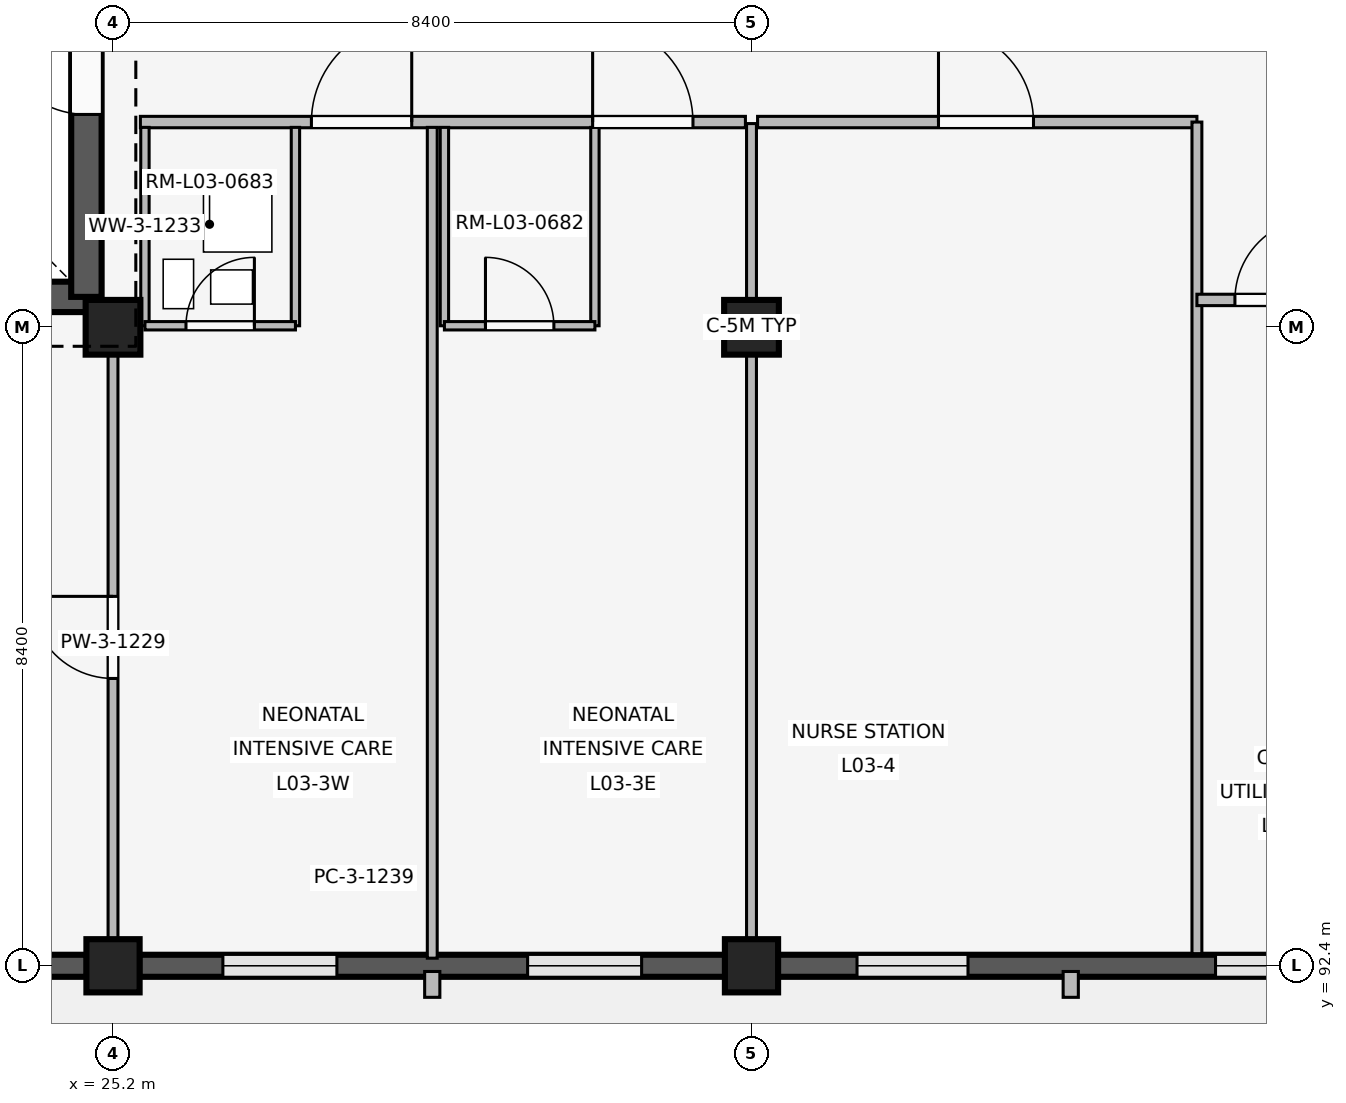
"""IFC4 building model, lengths in metres.
Left out: names, types, materials, properties, quantities, classifications, styles, units other than length and angle.
Written with IfcOpenShell. Run it as: python <this file> out.ifc"""

import sys

from ifc_helpers import new_model, si_unit, direction, frame, frame_2d, origin, origin_2d, place, context, subcontext, project, spatial, rectangle, extrude, element, fill, save


model = new_model("IFC4")
c1 = context("Model", 3, precision=1e-05, world=origin(), true_north=direction((0.0, 1.0)))
c2 = subcontext(c1, "Body", "Model", "MODEL_VIEW")
j1 = project(units=[si_unit("LENGTHUNIT", "METRE"), si_unit("PLANEANGLEUNIT", "RADIAN")], contexts=[c1])
p1 = place(None, origin())
s1 = spatial("IfcSite", under=j1, at=p1, CompositionType="ELEMENT")
p2 = place(p1, origin())
s2 = spatial("IfcBuilding", under=s1, at=p2, CompositionType="ELEMENT")
p3 = place(p2, frame((0.0, 0.0, 12.9)))
s3 = spatial("IfcBuildingStorey", under=s2, at=p3, CompositionType="ELEMENT", Elevation=12.9)
p4 = place(p3, frame((25.2, 92.4, 0.0), z_axis=(0.0, 0.0, 1.0), x_axis=(1.0, 0.0, 0.0)))
e1 = element("IfcColumn", 1, at=p4, inside=s3, PredefinedType="COLUMN", context=c2, shape_type="SweptSolid", body=[
    extrude(rectangle(XDim=0.7, YDim=0.7, at=origin_2d()), origin(), (0.0, 0.0, 1.0), 3.3),
])
p5 = place(p3, frame((25.2, 100.8, 0.0), z_axis=(0.0, 0.0, 1.0), x_axis=(1.0, 0.0, 0.0)))
e2 = element("IfcColumn", 2, at=p5, inside=s3, PredefinedType="COLUMN", context=c2, shape_type="SweptSolid", body=[
    extrude(rectangle(XDim=0.72, YDim=0.72, at=origin_2d()), origin(), (0.0, 0.0, 1.0), 3.3),
])
p6 = place(p3, frame((33.6, 92.4, 0.0), z_axis=(0.0, 0.0, 1.0), x_axis=(1.0, 0.0, 0.0)))
e3 = element("IfcColumn", 3, at=p6, inside=s3, PredefinedType="COLUMN", context=c2, shape_type="SweptSolid", body=[
    extrude(rectangle(XDim=0.7, YDim=0.7, at=origin_2d()), origin(), (0.0, 0.0, 1.0), 3.3),
])
p7 = place(p3, frame((33.6, 100.8, 0.0), z_axis=(0.0, 0.0, 1.0), x_axis=(1.0, 0.0, 0.0)))
e4 = element("IfcColumn", 4, at=p7, inside=s3, PredefinedType="COLUMN", context=c2, shape_type="SweptSolid", body=[
    extrude(rectangle(XDim=0.72, YDim=0.72, at=origin_2d()), origin(), (0.0, 0.0, 1.0), 3.3),
])
p8 = place(p3, frame((24.855, 92.4, 0.0), z_axis=(0.0, 0.0, 1.0), x_axis=(-1.0, 0.0, 0.0)))
e5 = element("IfcWall", 5, at=p8, inside=s3, PredefinedType="SOLIDWALL", context=c2, shape_type="SweptSolid", body=[
    extrude(rectangle(XDim=7.71, YDim=0.29, at=frame_2d((3.855, 0.0))), origin(), (0.0, 0.0, 1.0), 2.44),
])
p9 = place(p8, frame((1.2, 0.0, 1.05)))
e6 = element("IfcOpeningElement", 6, at=p9, cuts=e5, PredefinedType="OPENING", context=c2, shape_type="SweptSolid", body=[
    extrude(rectangle(XDim=1.3, YDim=0.75, at=frame_2d((0.65, 0.375))), frame((0.0, 0.155, 0.0), z_axis=(0.0, -1.0, 0.0), x_axis=(1.0, 0.0, 0.0)), (0.0, 0.0, 1.0), 0.31),
])
p10 = place(p8, frame((5.21, 0.0, 1.05)))
e7 = element("IfcOpeningElement", 7, at=p10, cuts=e5, PredefinedType="OPENING", context=c2, shape_type="SweptSolid", body=[
    extrude(rectangle(XDim=1.3, YDim=0.75, at=frame_2d((0.65, 0.375))), frame((0.0, 0.155, 0.0), z_axis=(0.0, -1.0, 0.0), x_axis=(1.0, 0.0, 0.0)), (0.0, 0.0, 1.0), 0.31),
])
p11 = place(p3, frame((33.255, 92.4, 0.0), z_axis=(0.0, 0.0, 1.0), x_axis=(-1.0, 0.0, 0.0)))
e8 = element("IfcWall", 8, at=p11, inside=s3, PredefinedType="SOLIDWALL", context=c2, shape_type="SweptSolid", body=[
    extrude(rectangle(XDim=7.71, YDim=0.29, at=frame_2d((3.855, 0.0))), origin(), (0.0, 0.0, 1.0), 2.44),
])
p12 = place(p11, frame((1.1, 0.0, 1.05)))
e9 = element("IfcOpeningElement", 9, at=p12, cuts=e8, PredefinedType="OPENING", context=c2, shape_type="SweptSolid", body=[
    extrude(rectangle(XDim=1.5, YDim=0.75, at=frame_2d((0.75, 0.375))), frame((0.0, 0.155, 0.0), z_axis=(0.0, -1.0, 0.0), x_axis=(1.0, 0.0, 0.0)), (0.0, 0.0, 1.0), 0.31),
])
p13 = place(p11, frame((5.11, 0.0, 1.05)))
e10 = element("IfcOpeningElement", 10, at=p13, cuts=e8, PredefinedType="OPENING", context=c2, shape_type="SweptSolid", body=[
    extrude(rectangle(XDim=1.5, YDim=0.75, at=frame_2d((0.75, 0.375))), frame((0.0, 0.155, 0.0), z_axis=(0.0, -1.0, 0.0), x_axis=(1.0, 0.0, 0.0)), (0.0, 0.0, 1.0), 0.31),
])
p14 = place(p3, frame((29.4, 92.325, 0.0), z_axis=(0.0, 0.0, 1.0), x_axis=(0.0, -1.0, 0.0)))
e11 = element("IfcWall", 11, at=p14, inside=s3, PredefinedType="ELEMENTEDWALL", context=c2, shape_type="SweptSolid", body=[
    extrude(rectangle(XDim=0.34, YDim=0.2, at=frame_2d((0.17, 0.0))), origin(), (0.0, 0.0, 1.0), 2.42),
])
p15 = place(p3, frame((41.655, 92.4, 0.0), z_axis=(0.0, 0.0, 1.0), x_axis=(-1.0, 0.0, 0.0)))
e12 = element("IfcWall", 12, at=p15, inside=s3, PredefinedType="SOLIDWALL", context=c2, shape_type="SweptSolid", body=[
    extrude(rectangle(XDim=7.71, YDim=0.29, at=frame_2d((3.855, 0.0))), origin(), (0.0, 0.0, 1.0), 2.44),
])
p16 = place(p15, frame((0.49, 0.0, 0.85)))
e13 = element("IfcOpeningElement", 13, at=p16, cuts=e12, PredefinedType="OPENING", context=c2, shape_type="SweptSolid", body=[
    extrude(rectangle(XDim=1.46, YDim=0.85, at=frame_2d((0.73, 0.425))), frame((0.0, 0.155, 0.0), z_axis=(0.0, -1.0, 0.0), x_axis=(1.0, 0.0, 0.0)), (0.0, 0.0, 1.0), 0.31),
])
p17 = place(p15, frame((5.207, 0.0, 0.85)))
e14 = element("IfcOpeningElement", 14, at=p17, cuts=e12, PredefinedType="OPENING", context=c2, shape_type="SweptSolid", body=[
    extrude(rectangle(XDim=1.46, YDim=0.85, at=frame_2d((0.73, 0.425))), frame((0.0, 0.155, 0.0), z_axis=(0.0, -1.0, 0.0), x_axis=(1.0, 0.0, 0.0)), (0.0, 0.0, 1.0), 0.31),
])
p18 = place(p3, frame((37.8, 92.325, 0.0), z_axis=(0.0, 0.0, 1.0), x_axis=(0.0, -1.0, 0.0)))
e15 = element("IfcWall", 15, at=p18, inside=s3, PredefinedType="ELEMENTEDWALL", context=c2, shape_type="SweptSolid", body=[
    extrude(rectangle(XDim=0.34, YDim=0.2, at=frame_2d((0.17, 0.0))), origin(), (0.0, 0.0, 1.0), 2.42),
])
p19 = place(p3, frame((17.35, 101.2, 0.0), z_axis=(0.0, 0.0, 1.0), x_axis=(1.0, 0.0, 0.0)))
e16 = element("IfcWall", 16, at=p19, inside=s3, PredefinedType="SHEAR", context=c2, shape_type="SweptSolid", body=[
    extrude(rectangle(XDim=7.5, YDim=0.4, at=frame_2d((3.75, 0.0))), origin(), (0.0, 0.0, 1.0), 3.02),
])
p20 = place(p19, frame((4.85, 0.0, 0.0)))
e17 = element("IfcOpeningElement", 17, at=p20, cuts=e16, PredefinedType="OPENING", context=c2, shape_type="SweptSolid", body=[
    extrude(rectangle(XDim=1.2, YDim=2.2, at=frame_2d((0.6, 1.1))), frame((0.0, 0.21, 0.0), z_axis=(0.0, -1.0, 0.0), x_axis=(1.0, 0.0, 0.0)), (0.0, 0.0, 1.0), 0.42),
])
p21 = place(p3, frame((24.85, 101.2, 0.0), z_axis=(0.0, 0.0, 1.0), x_axis=(0.0, 1.0, 0.0)))
e18 = element("IfcWall", 18, at=p21, inside=s3, PredefinedType="SHEAR", context=c2, shape_type="SweptSolid", body=[
    extrude(rectangle(XDim=7.55, YDim=0.4, at=frame_2d((3.775, 0.0))), origin(), (0.0, 0.0, 1.0), 3.02),
])
p22 = place(p21, frame((2.4, 0.0, 0.0)))
e19 = element("IfcOpeningElement", 19, at=p22, cuts=e18, PredefinedType="OPENING", context=c2, shape_type="SweptSolid", body=[
    extrude(rectangle(XDim=1.2, YDim=2.2, at=frame_2d((0.6, 1.1))), frame((0.0, 0.21, 0.0), z_axis=(0.0, -1.0, 0.0), x_axis=(1.0, 0.0, 0.0)), (0.0, 0.0, 1.0), 0.42),
])
p23 = place(p3, frame((25.2, 92.54, 0.0), z_axis=(0.0, 0.0, 1.0), x_axis=(0.0, 1.0, 0.0)))
e20 = element("IfcWall", 20, at=p23, inside=s3, PredefinedType="PARTITIONING", context=c2, shape_type="SweptSolid", body=[
    extrude(rectangle(XDim=8.21, YDim=0.13, at=frame_2d((4.105, 0.0))), origin(), (0.0, 0.0, 1.0), 2.42),
])
p24 = place(p23, frame((3.64, 0.0, 0.0)))
e21 = element("IfcOpeningElement", 21, at=p24, cuts=e20, PredefinedType="OPENING", context=c2, shape_type="SweptSolid", body=[
    extrude(rectangle(XDim=1.08, YDim=2.15, at=frame_2d((0.54, 1.075))), frame((0.0, 0.075, 0.0), z_axis=(0.0, -1.0, 0.0), x_axis=(1.0, 0.0, 0.0)), (0.0, 0.0, 1.0), 0.15),
])
p25 = place(p3, frame((25.56, 103.5, 0.0), z_axis=(0.0, 0.0, 1.0), x_axis=(1.0, 0.0, 0.0)))
e22 = element("IfcWall", 22, at=p25, inside=s3, PredefinedType="PARTITIONING", context=c2, shape_type="SweptSolid", body=[
    extrude(rectangle(XDim=7.96, YDim=0.15, at=frame_2d((3.98, 0.0))), origin(), (0.0, 0.0, 1.0), 2.42),
])
p26 = place(p25, frame((2.25, 0.0, 0.0)))
e23 = element("IfcOpeningElement", 23, at=p26, cuts=e22, PredefinedType="OPENING", context=c2, shape_type="SweptSolid", body=[
    extrude(rectangle(XDim=1.32, YDim=2.25, at=frame_2d((0.66, 1.125))), frame((0.0, 0.085, 0.0), z_axis=(0.0, -1.0, 0.0), x_axis=(1.0, 0.0, 0.0)), (0.0, 0.0, 1.0), 0.17),
])
p27 = place(p25, frame((5.95, 0.0, 0.0)))
e24 = element("IfcOpeningElement", 24, at=p27, cuts=e22, PredefinedType="OPENING", context=c2, shape_type="SweptSolid", body=[
    extrude(rectangle(XDim=1.32, YDim=2.25, at=frame_2d((0.66, 1.125))), frame((0.0, 0.085, 0.0), z_axis=(0.0, -1.0, 0.0), x_axis=(1.0, 0.0, 0.0)), (0.0, 0.0, 1.0), 0.17),
])
p28 = place(p3, frame((29.4, 92.5, 0.0), z_axis=(0.0, 0.0, 1.0), x_axis=(0.0, 1.0, 0.0)))
e25 = element("IfcWall", 25, at=p28, inside=s3, PredefinedType="PARTITIONING", context=c2, shape_type="SweptSolid", body=[
    extrude(rectangle(XDim=10.93, YDim=0.13, at=frame_2d((5.465, 0.0))), origin(), (0.0, 0.0, 1.0), 2.42),
])
for number, where, z_axis, x_axis in (
    (26, (25.62, 100.82, 0.0), (0.0, 0.0, 1.0), (0.0, 1.0, 0.0)),
    (27, (27.6, 100.82, 0.0), (0.0, 0.0, 1.0), (0.0, 1.0, 0.0)),
):
    element("IfcWall", number, at=place(p3, frame(where, z_axis=z_axis, x_axis=x_axis)), inside=s3, PredefinedType="PARTITIONING", context=c2, shape_type="SweptSolid", body=[
        extrude(rectangle(XDim=2.61, YDim=0.11, at=frame_2d((1.305, 0.0))), origin(), (0.0, 0.0, 1.0), 2.42),
    ])
p29 = place(p3, frame((25.62, 100.82, 0.0), z_axis=(0.0, 0.0, 1.0), x_axis=(1.0, 0.0, 0.0)))
e28 = element("IfcWall", 28, at=p29, inside=s3, PredefinedType="PARTITIONING", context=c2, shape_type="SweptSolid", body=[
    extrude(rectangle(XDim=1.98, YDim=0.11, at=frame_2d((0.99, 0.0))), origin(), (0.0, 0.0, 1.0), 2.42),
])
p30 = place(p29, frame((0.54, 0.0, 0.0)))
e29 = element("IfcOpeningElement", 29, at=p30, cuts=e28, PredefinedType="OPENING", context=c2, shape_type="SweptSolid", body=[
    extrude(rectangle(XDim=0.9, YDim=2.1, at=frame_2d((0.45, 1.05))), frame((0.0, 0.065, 0.0), z_axis=(0.0, -1.0, 0.0), x_axis=(1.0, 0.0, 0.0)), (0.0, 0.0, 1.0), 0.13),
])
for number, where, z_axis, x_axis in (
    (30, (29.56, 100.82, 0.0), (0.0, 0.0, 1.0), (0.0, 1.0, 0.0)),
    (31, (31.54, 100.82, 0.0), (0.0, 0.0, 1.0), (0.0, 1.0, 0.0)),
):
    element("IfcWall", number, at=place(p3, frame(where, z_axis=z_axis, x_axis=x_axis)), inside=s3, PredefinedType="PARTITIONING", context=c2, shape_type="SweptSolid", body=[
        extrude(rectangle(XDim=2.61, YDim=0.11, at=frame_2d((1.305, 0.0))), origin(), (0.0, 0.0, 1.0), 2.42),
    ])
p31 = place(p3, frame((29.56, 100.82, 0.0), z_axis=(0.0, 0.0, 1.0), x_axis=(1.0, 0.0, 0.0)))
e32 = element("IfcWall", 32, at=p31, inside=s3, PredefinedType="PARTITIONING", context=c2, shape_type="SweptSolid", body=[
    extrude(rectangle(XDim=1.98, YDim=0.11, at=frame_2d((0.99, 0.0))), origin(), (0.0, 0.0, 1.0), 2.42),
])
p32 = place(p31, frame((0.54, 0.0, 0.0)))
e33 = element("IfcOpeningElement", 33, at=p32, cuts=e32, PredefinedType="OPENING", context=c2, shape_type="SweptSolid", body=[
    extrude(rectangle(XDim=0.9, YDim=2.1, at=frame_2d((0.45, 1.05))), frame((0.0, 0.065, 0.0), z_axis=(0.0, -1.0, 0.0), x_axis=(1.0, 0.0, 0.0)), (0.0, 0.0, 1.0), 0.13),
])
p33 = place(p3, frame((28.05, 93.55, 0.0), z_axis=(0.0, 0.0, 1.0), x_axis=(1.0, 0.0, 0.0)))
e34 = element("IfcWall", 34, at=p33, inside=s3, PredefinedType="PLUMBINGWALL", context=c2, shape_type="SweptSolid", body=[
    extrude(rectangle(XDim=0.9, YDim=0.24, at=frame_2d((0.45, 0.0))), origin(), (0.0, 0.0, 1.0), 2.42),
])
p34 = place(p3, frame((33.6, 92.54, 0.0), z_axis=(0.0, 0.0, 1.0), x_axis=(0.0, 1.0, 0.0)))
e35 = element("IfcWall", 35, at=p34, inside=s3, PredefinedType="PARTITIONING", context=c2, shape_type="SweptSolid", body=[
    extrude(rectangle(XDim=10.94, YDim=0.13, at=frame_2d((5.47, 0.0))), origin(), (0.0, 0.0, 1.0), 2.42),
])
p35 = place(p3, frame((33.68, 103.5, 0.0), z_axis=(0.0, 0.0, 1.0), x_axis=(1.0, 0.0, 0.0)))
e36 = element("IfcWall", 36, at=p35, inside=s3, PredefinedType="PARTITIONING", context=c2, shape_type="SweptSolid", body=[
    extrude(rectangle(XDim=5.78, YDim=0.15, at=frame_2d((2.89, 0.0))), origin(), (0.0, 0.0, 1.0), 2.42),
])
p36 = place(p35, frame((2.38, 0.0, 0.0)))
e37 = element("IfcOpeningElement", 37, at=p36, cuts=e36, PredefinedType="OPENING", context=c2, shape_type="SweptSolid", body=[
    extrude(rectangle(XDim=1.25, YDim=2.2, at=frame_2d((0.625, 1.1))), frame((0.0, 0.085, 0.0), z_axis=(0.0, -1.0, 0.0), x_axis=(1.0, 0.0, 0.0)), (0.0, 0.0, 1.0), 0.17),
])
p37 = place(p3, frame((39.46, 92.56, 0.0), z_axis=(0.0, 0.0, 1.0), x_axis=(0.0, 1.0, 0.0)))
e38 = element("IfcWall", 38, at=p37, inside=s3, PredefinedType="PARTITIONING", context=c2, shape_type="SweptSolid", body=[
    extrude(rectangle(XDim=10.94, YDim=0.13, at=frame_2d((5.47, 0.0))), origin(), (0.0, 0.0, 1.0), 2.42),
])
p38 = place(p3, frame((39.46, 101.16, 0.0), z_axis=(0.0, 0.0, 1.0), x_axis=(1.0, 0.0, 0.0)))
e39 = element("IfcWall", 39, at=p38, inside=s3, PredefinedType="PARTITIONING", context=c2, shape_type="SweptSolid", body=[
    extrude(rectangle(XDim=2.18, YDim=0.15, at=frame_2d((1.09, 0.0))), origin(), (0.0, 0.0, 1.0), 2.42),
])
p39 = place(p38, frame((0.5, 0.0, 0.0)))
e40 = element("IfcOpeningElement", 40, at=p39, cuts=e39, PredefinedType="OPENING", context=c2, shape_type="SweptSolid", body=[
    extrude(rectangle(XDim=1.08, YDim=2.15, at=frame_2d((0.54, 1.075))), frame((0.0, 0.085, 0.0), z_axis=(0.0, -1.0, 0.0), x_axis=(1.0, 0.0, 0.0)), (0.0, 0.0, 1.0), 0.17),
])
p40 = place(p12, origin())
e41 = element("IfcWindow", 41, at=p40, inside=s3, PartitioningType="SINGLE_PANEL", PredefinedType="WINDOW", context=c2, shape_type="SweptSolid", body=[
    extrude(rectangle(XDim=1.5, YDim=0.75, at=frame_2d((0.75, 0.375))), frame((0.0, 0.03, 0.0), z_axis=(0.0, -1.0, 0.0), x_axis=(1.0, 0.0, 0.0)), (0.0, 0.0, 1.0), 0.06),
])
fill(e9, e41)
p41 = place(p13, origin())
e42 = element("IfcWindow", 42, at=p41, inside=s3, PartitioningType="SINGLE_PANEL", PredefinedType="WINDOW", context=c2, shape_type="SweptSolid", body=[
    extrude(rectangle(XDim=1.5, YDim=0.75, at=frame_2d((0.75, 0.375))), frame((0.0, 0.03, 0.0), z_axis=(0.0, -1.0, 0.0), x_axis=(1.0, 0.0, 0.0)), (0.0, 0.0, 1.0), 0.06),
])
fill(e10, e42)
p42 = place(p16, origin())
e43 = element("IfcWindow", 43, at=p42, inside=s3, PartitioningType="SINGLE_PANEL", PredefinedType="WINDOW", context=c2, shape_type="SweptSolid", body=[
    extrude(rectangle(XDim=1.46, YDim=0.85, at=frame_2d((0.73, 0.425))), frame((0.0, 0.03, 0.0), z_axis=(0.0, -1.0, 0.0), x_axis=(1.0, 0.0, 0.0)), (0.0, 0.0, 1.0), 0.06),
])
fill(e13, e43)
p43 = place(p17, origin())
e44 = element("IfcWindow", 44, at=p43, inside=s3, PartitioningType="SINGLE_PANEL", PredefinedType="WINDOW", context=c2, shape_type="SweptSolid", body=[
    extrude(rectangle(XDim=1.46, YDim=0.85, at=frame_2d((0.73, 0.425))), frame((0.0, 0.03, 0.0), z_axis=(0.0, -1.0, 0.0), x_axis=(1.0, 0.0, 0.0)), (0.0, 0.0, 1.0), 0.06),
])
fill(e14, e44)
p44 = place(p22, origin())
e45 = element("IfcDoor", 45, at=p44, inside=s3, OperationType="SINGLE_SWING_RIGHT", PredefinedType="DOOR", context=c2, shape_type="SweptSolid", body=[
    extrude(rectangle(XDim=1.2, YDim=2.2, at=frame_2d((0.6, 1.1))), frame((0.0, 0.025, 0.0), z_axis=(0.0, -1.0, 0.0), x_axis=(1.0, 0.0, 0.0)), (0.0, 0.0, 1.0), 0.05),
])
fill(e19, e45)
p45 = place(p24, origin())
e46 = element("IfcDoor", 46, at=p45, inside=s3, OperationType="SINGLE_SWING_RIGHT", PredefinedType="DOOR", context=c2, shape_type="SweptSolid", body=[
    extrude(rectangle(XDim=1.08, YDim=2.15, at=frame_2d((0.54, 1.075))), frame((0.0, 0.025, 0.0), z_axis=(0.0, -1.0, 0.0), x_axis=(1.0, 0.0, 0.0)), (0.0, 0.0, 1.0), 0.05),
])
fill(e21, e46)
p46 = place(p26, origin())
e47 = element("IfcDoor", 47, at=p46, inside=s3, OperationType="SINGLE_SWING_RIGHT", PredefinedType="DOOR", context=c2, shape_type="SweptSolid", body=[
    extrude(rectangle(XDim=1.32, YDim=2.25, at=frame_2d((0.66, 1.125))), frame((0.0, 0.025, 0.0), z_axis=(0.0, -1.0, 0.0), x_axis=(1.0, 0.0, 0.0)), (0.0, 0.0, 1.0), 0.05),
])
fill(e23, e47)
p47 = place(p27, origin())
e48 = element("IfcDoor", 48, at=p47, inside=s3, OperationType="SINGLE_SWING_LEFT", PredefinedType="DOOR", context=c2, shape_type="SweptSolid", body=[
    extrude(rectangle(XDim=1.32, YDim=2.25, at=frame_2d((0.66, 1.125))), frame((0.0, 0.025, 0.0), z_axis=(0.0, -1.0, 0.0), x_axis=(1.0, 0.0, 0.0)), (0.0, 0.0, 1.0), 0.05),
])
fill(e24, e48)
p48 = place(p30, origin())
e49 = element("IfcDoor", 49, at=p48, inside=s3, OperationType="SINGLE_SWING_RIGHT", PredefinedType="DOOR", context=c2, shape_type="SweptSolid", body=[
    extrude(rectangle(XDim=0.9, YDim=2.1, at=frame_2d((0.45, 1.05))), frame((0.0, 0.025, 0.0), z_axis=(0.0, -1.0, 0.0), x_axis=(1.0, 0.0, 0.0)), (0.0, 0.0, 1.0), 0.05),
])
fill(e29, e49)
p49 = place(p32, origin())
e50 = element("IfcDoor", 50, at=p49, inside=s3, OperationType="SINGLE_SWING_LEFT", PredefinedType="DOOR", context=c2, shape_type="SweptSolid", body=[
    extrude(rectangle(XDim=0.9, YDim=2.1, at=frame_2d((0.45, 1.05))), frame((0.0, 0.025, 0.0), z_axis=(0.0, -1.0, 0.0), x_axis=(1.0, 0.0, 0.0)), (0.0, 0.0, 1.0), 0.05),
])
fill(e33, e50)
p50 = place(p36, origin())
e51 = element("IfcDoor", 51, at=p50, inside=s3, OperationType="SINGLE_SWING_LEFT", PredefinedType="DOOR", context=c2, shape_type="SweptSolid", body=[
    extrude(rectangle(XDim=1.25, YDim=2.2, at=frame_2d((0.625, 1.1))), frame((0.0, 0.025, 0.0), z_axis=(0.0, -1.0, 0.0), x_axis=(1.0, 0.0, 0.0)), (0.0, 0.0, 1.0), 0.05),
])
fill(e37, e51)
p51 = place(p39, origin())
e52 = element("IfcDoor", 52, at=p51, inside=s3, OperationType="SINGLE_SWING_RIGHT", PredefinedType="DOOR", context=c2, shape_type="SweptSolid", body=[
    extrude(rectangle(XDim=1.08, YDim=2.15, at=frame_2d((0.54, 1.075))), frame((0.0, 0.025, 0.0), z_axis=(0.0, -1.0, 0.0), x_axis=(1.0, 0.0, 0.0)), (0.0, 0.0, 1.0), 0.05),
])
fill(e40, e52)
save(model, sys.argv[1])
